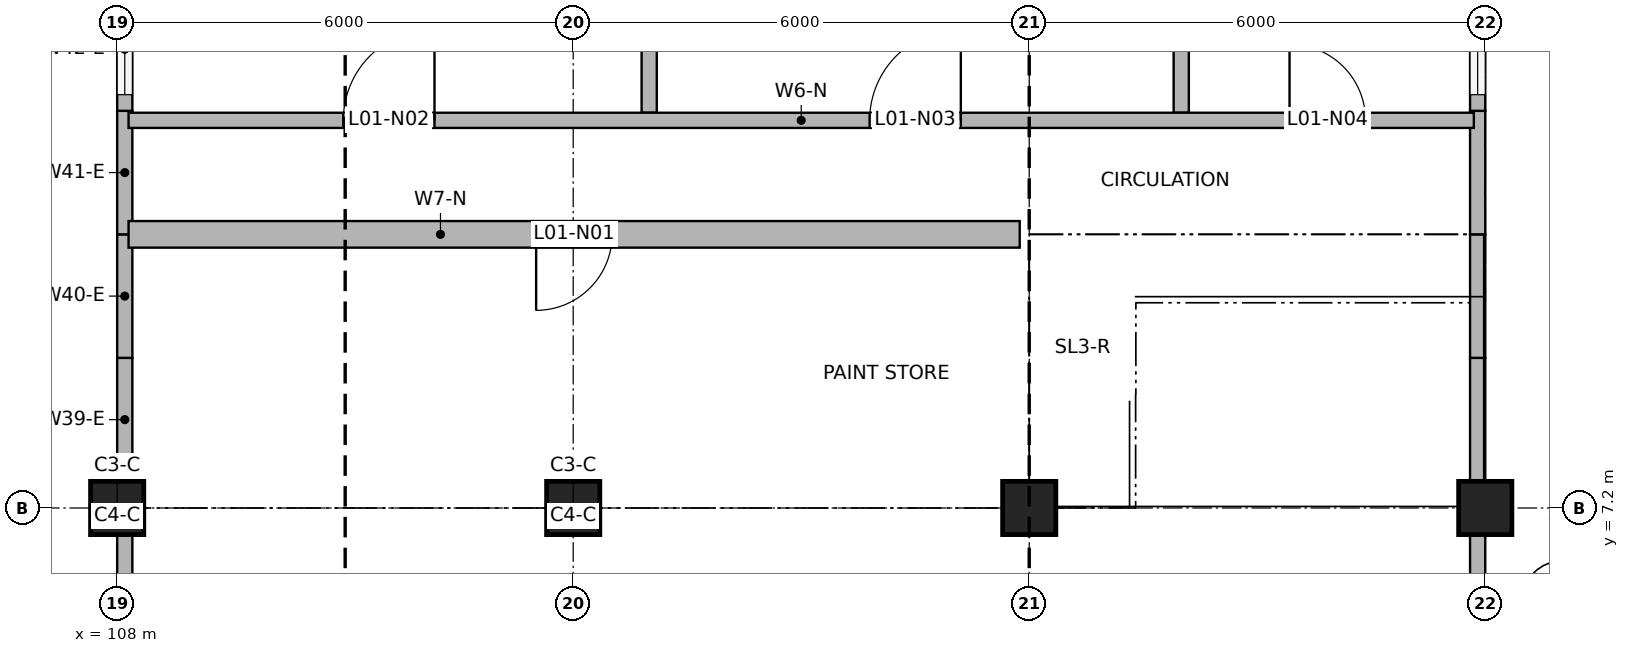
"""IFC4 building model, lengths in metres.
Left out: names, types, materials, properties, quantities, classifications, styles, units other than length and angle.
Written with IfcOpenShell. Run it as: python <this file> out.ifc"""

import sys

from ifc_helpers import new_model, si_unit, direction, frame, frame_2d, origin, origin_2d, place, context, subcontext, project, spatial, rectangle, hollow_rectangle, extrude, element, fill, save


model = new_model("IFC4")
c1 = context("Model", 3, precision=1e-05, world=origin(), true_north=direction((0.0, 1.0)))
c2 = subcontext(c1, "Body", "Model", "MODEL_VIEW")
j1 = project(units=[si_unit("LENGTHUNIT", "METRE"), si_unit("PLANEANGLEUNIT", "RADIAN")], contexts=[c1])
p1 = place(None, origin())
s1 = spatial("IfcSite", under=j1, at=p1, CompositionType="ELEMENT")
p2 = place(p1, origin())
s2 = spatial("IfcBuilding", under=s1, at=p2, CompositionType="ELEMENT")
p3 = place(p2, frame((0.0, 0.0, 4.2)))
s3 = spatial("IfcBuildingStorey", under=s2, at=p3, CompositionType="ELEMENT", Elevation=4.2)
for number, where, z_axis, x_axis in (
    (1, (108.0, 7.2, 0.0), (0.0, 0.0, 1.0), (1.0, 0.0, 0.0)),
    (2, (114.0, 7.2, 0.0), (0.0, 0.0, 1.0), (1.0, 0.0, 0.0)),
    (3, (120.0, 7.2, 0.0), (0.0, 0.0, 1.0), (1.0, 0.0, 0.0)),
    (4, (126.0, 7.2, 0.0), (0.0, 0.0, 1.0), (1.0, 0.0, 0.0)),
):
    element("IfcColumn", number, at=place(p3, frame(where, z_axis=z_axis, x_axis=x_axis)), inside=s3, PredefinedType="COLUMN", context=c2, shape_type="SweptSolid", body=[
        extrude(rectangle(XDim=0.7, YDim=0.7, at=origin_2d()), origin(), (0.0, 0.0, 1.0), 4.004),
    ])
for number, where, z_axis, x_axis in (
    (5, (108.0, 7.1, 4.004), (0.0, 0.0, 1.0), (1.0, 0.0, 0.0)),
    (6, (114.0, 7.1, 4.004), (0.0, 0.0, 1.0), (1.0, 0.0, 0.0)),
    (7, (120.0, 7.1, 4.004), (0.0, 0.0, 1.0), (1.0, 0.0, 0.0)),
    (8, (126.0, 7.1, 4.004), (0.0, 0.0, 1.0), (1.0, 0.0, 0.0)),
):
    element("IfcColumn", number, at=place(p3, frame(where, z_axis=z_axis, x_axis=x_axis)), inside=s3, PredefinedType="COLUMN", context=c2, shape_type="SweptSolid", body=[
        extrude(hollow_rectangle(XDim=0.15, YDim=0.15, WallThickness=0.008, at=origin_2d()), origin(), (0.0, 0.0, 1.0), 1.155),
    ])
p4 = place(p3, frame((125.9, 5.225, 0.0), z_axis=(0.0, 0.0, 1.0), x_axis=(0.0, 1.0, 0.0)))
e9 = element("IfcWall", 9, at=p4, inside=s3, PredefinedType="SOLIDWALL", context=c2, shape_type="SweptSolid", body=[
    extrude(rectangle(XDim=1.625, YDim=0.2, at=frame_2d((0.812, 0.0))), origin(), (0.0, 0.0, 1.0), 5.007),
])
p5 = place(p3, frame((125.9, 7.55, 0.0), z_axis=(0.0, 0.0, 1.0), x_axis=(0.0, 1.0, 0.0)))
e10 = element("IfcWall", 10, at=p5, inside=s3, PredefinedType="SOLIDWALL", context=c2, shape_type="SweptSolid", body=[
    extrude(rectangle(XDim=1.625, YDim=0.2, at=frame_2d((0.812, 0.0))), origin(), (0.0, 0.0, 1.0), 4.059),
])
p6 = place(p3, frame((125.9, 9.175, 0.0), z_axis=(0.0, 0.0, 1.0), x_axis=(0.0, 1.0, 0.0)))
e11 = element("IfcWall", 11, at=p6, inside=s3, PredefinedType="SOLIDWALL", context=c2, shape_type="SweptSolid", body=[
    extrude(rectangle(XDim=1.625, YDim=0.2, at=frame_2d((0.812, 0.0))), origin(), (0.0, 0.0, 1.0), 4.375),
])
p7 = place(p3, frame((125.9, 10.8, 0.0), z_axis=(0.0, 0.0, 1.0), x_axis=(0.0, 1.0, 0.0)))
e12 = element("IfcWall", 12, at=p7, inside=s3, PredefinedType="SOLIDWALL", context=c2, shape_type="SweptSolid", body=[
    extrude(rectangle(XDim=1.625, YDim=0.2, at=frame_2d((0.812, 0.0))), origin(), (0.0, 0.0, 1.0), 4.691),
])
p8 = place(p3, frame((125.9, 12.425, 0.0), z_axis=(0.0, 0.0, 1.0), x_axis=(0.0, 1.0, 0.0)))
e13 = element("IfcWall", 13, at=p8, inside=s3, PredefinedType="SOLIDWALL", context=c2, shape_type="SweptSolid", body=[
    extrude(rectangle(XDim=1.625, YDim=0.2, at=frame_2d((0.812, 0.0))), origin(), (0.0, 0.0, 1.0), 5.007),
])
p9 = place(p8, frame((0.212, 0.0, 1.2)))
e14 = element("IfcOpeningElement", 14, at=p9, cuts=e13, PredefinedType="OPENING", context=c2, shape_type="SweptSolid", body=[
    extrude(rectangle(XDim=1.2, YDim=1.4, at=frame_2d((0.6, 0.7))), frame((0.0, 0.11, 0.0), z_axis=(0.0, -1.0, 0.0), x_axis=(1.0, 0.0, 0.0)), (0.0, 0.0, 1.0), 0.22),
])
p10 = place(p3, frame((108.1, 5.225, 0.0), z_axis=(0.0, 0.0, 1.0), x_axis=(0.0, 1.0, 0.0)))
e15 = element("IfcWall", 15, at=p10, inside=s3, PredefinedType="SOLIDWALL", context=c2, shape_type="SweptSolid", body=[
    extrude(rectangle(XDim=1.625, YDim=0.2, at=frame_2d((0.812, 0.0))), origin(), (0.0, 0.0, 1.0), 5.007),
])
p11 = place(p3, frame((108.1, 7.55, 0.0), z_axis=(0.0, 0.0, 1.0), x_axis=(0.0, 1.0, 0.0)))
e16 = element("IfcWall", 16, at=p11, inside=s3, PredefinedType="SOLIDWALL", context=c2, shape_type="SweptSolid", body=[
    extrude(rectangle(XDim=1.625, YDim=0.2, at=frame_2d((0.812, 0.0))), origin(), (0.0, 0.0, 1.0), 4.059),
])
p12 = place(p3, frame((108.1, 9.175, 0.0), z_axis=(0.0, 0.0, 1.0), x_axis=(0.0, 1.0, 0.0)))
e17 = element("IfcWall", 17, at=p12, inside=s3, PredefinedType="SOLIDWALL", context=c2, shape_type="SweptSolid", body=[
    extrude(rectangle(XDim=1.625, YDim=0.2, at=frame_2d((0.812, 0.0))), origin(), (0.0, 0.0, 1.0), 4.375),
])
p13 = place(p3, frame((108.1, 10.8, 0.0), z_axis=(0.0, 0.0, 1.0), x_axis=(0.0, 1.0, 0.0)))
e18 = element("IfcWall", 18, at=p13, inside=s3, PredefinedType="SOLIDWALL", context=c2, shape_type="SweptSolid", body=[
    extrude(rectangle(XDim=1.625, YDim=0.2, at=frame_2d((0.812, 0.0))), origin(), (0.0, 0.0, 1.0), 4.691),
])
p14 = place(p3, frame((108.1, 12.425, 0.0), z_axis=(0.0, 0.0, 1.0), x_axis=(0.0, 1.0, 0.0)))
e19 = element("IfcWall", 19, at=p14, inside=s3, PredefinedType="SOLIDWALL", context=c2, shape_type="SweptSolid", body=[
    extrude(rectangle(XDim=1.625, YDim=0.2, at=frame_2d((0.812, 0.0))), origin(), (0.0, 0.0, 1.0), 5.007),
])
p15 = place(p14, frame((0.212, 0.0, 1.2)))
e20 = element("IfcOpeningElement", 20, at=p15, cuts=e19, PredefinedType="OPENING", context=c2, shape_type="SweptSolid", body=[
    extrude(rectangle(XDim=1.2, YDim=1.4, at=frame_2d((0.6, 0.7))), frame((0.0, 0.11, 0.0), z_axis=(0.0, -1.0, 0.0), x_axis=(1.0, 0.0, 0.0)), (0.0, 0.0, 1.0), 0.22),
])
for number, where, z_axis, x_axis in (
    (21, (115.0, 12.4, 0.0), (0.0, 0.0, 1.0), (0.0, 1.0, 0.0)),
    (22, (122.0, 12.4, 0.0), (0.0, 0.0, 1.0), (0.0, 1.0, 0.0)),
):
    element("IfcWall", number, at=place(p3, frame(where, z_axis=z_axis, x_axis=x_axis)), inside=s3, PredefinedType="PARTITIONING", context=c2, shape_type="SweptSolid", body=[
        extrude(rectangle(XDim=9.05, YDim=0.2, at=frame_2d((4.525, 0.0))), origin(), (0.0, 0.0, 1.0), 3.204),
    ])
p16 = place(p3, frame((108.15, 10.8, 0.0), z_axis=(0.0, 0.0, 1.0), x_axis=(1.0, 0.0, 0.0)))
e23 = element("IfcWall", 23, at=p16, inside=s3, PredefinedType="PARTITIONING", context=c2, shape_type="SweptSolid", body=[
    extrude(rectangle(XDim=11.725, YDim=0.35, at=frame_2d((5.863, 0.0))), origin(), (0.0, 0.0, 1.0), 3.95),
])
p17 = place(p16, frame((5.363, 0.0, 0.0)))
e24 = element("IfcOpeningElement", 24, at=p17, cuts=e23, PredefinedType="OPENING", context=c2, shape_type="SweptSolid", body=[
    extrude(rectangle(XDim=1.0, YDim=2.1, at=frame_2d((0.5, 1.05))), frame((0.0, 0.185, 0.0), z_axis=(0.0, -1.0, 0.0), x_axis=(1.0, 0.0, 0.0)), (0.0, 0.0, 1.0), 0.37),
])
p18 = place(p3, frame((108.15, 12.3, 0.0), z_axis=(0.0, 0.0, 1.0), x_axis=(1.0, 0.0, 0.0)))
e25 = element("IfcWall", 25, at=p18, inside=s3, PredefinedType="PARTITIONING", context=c2, shape_type="SweptSolid", body=[
    extrude(rectangle(XDim=17.7, YDim=0.2, at=frame_2d((8.85, 0.0))), origin(), (0.0, 0.0, 1.0), 3.95),
])
p19 = place(p18, frame((2.825, 0.0, 0.0)))
e26 = element("IfcOpeningElement", 26, at=p19, cuts=e25, PredefinedType="OPENING", context=c2, shape_type="SweptSolid", body=[
    extrude(rectangle(XDim=1.2, YDim=2.1, at=frame_2d((0.6, 1.05))), frame((0.0, 0.11, 0.0), z_axis=(0.0, -1.0, 0.0), x_axis=(1.0, 0.0, 0.0)), (0.0, 0.0, 1.0), 0.22),
])
p20 = place(p18, frame((9.75, 0.0, 0.0)))
e27 = element("IfcOpeningElement", 27, at=p20, cuts=e25, PredefinedType="OPENING", context=c2, shape_type="SweptSolid", body=[
    extrude(rectangle(XDim=1.2, YDim=2.1, at=frame_2d((0.6, 1.05))), frame((0.0, 0.11, 0.0), z_axis=(0.0, -1.0, 0.0), x_axis=(1.0, 0.0, 0.0)), (0.0, 0.0, 1.0), 0.22),
])
p21 = place(p18, frame((15.275, 0.0, 0.0)))
e28 = element("IfcOpeningElement", 28, at=p21, cuts=e25, PredefinedType="OPENING", context=c2, shape_type="SweptSolid", body=[
    extrude(rectangle(XDim=1.0, YDim=2.1, at=frame_2d((0.5, 1.05))), frame((0.0, 0.11, 0.0), z_axis=(0.0, -1.0, 0.0), x_axis=(1.0, 0.0, 0.0)), (0.0, 0.0, 1.0), 0.22),
])
p22 = place(p9, origin())
e29 = element("IfcWindow", 29, at=p22, inside=s3, PartitioningType="SINGLE_PANEL", PredefinedType="WINDOW", context=c2, shape_type="SweptSolid", body=[
    extrude(rectangle(XDim=1.2, YDim=1.4, at=frame_2d((0.6, 0.7))), frame((0.0, 0.03, 0.0), z_axis=(0.0, -1.0, 0.0), x_axis=(1.0, 0.0, 0.0)), (0.0, 0.0, 1.0), 0.06),
])
fill(e14, e29)
p23 = place(p15, origin())
e30 = element("IfcWindow", 30, at=p23, inside=s3, PartitioningType="SINGLE_PANEL", PredefinedType="WINDOW", context=c2, shape_type="SweptSolid", body=[
    extrude(rectangle(XDim=1.2, YDim=1.4, at=frame_2d((0.6, 0.7))), frame((0.0, 0.03, 0.0), z_axis=(0.0, -1.0, 0.0), x_axis=(1.0, 0.0, 0.0)), (0.0, 0.0, 1.0), 0.06),
])
fill(e20, e30)
p24 = place(p17, frame((1.0, 0.0, 0.0), z_axis=(0.0, 0.0, 1.0), x_axis=(-1.0, 0.0, 0.0)))
e31 = element("IfcDoor", 31, at=p24, inside=s3, OperationType="SINGLE_SWING_RIGHT", PredefinedType="DOOR", context=c2, shape_type="SweptSolid", body=[
    extrude(rectangle(XDim=1.0, YDim=2.1, at=frame_2d((0.5, 1.05))), frame((0.0, 0.025, 0.0), z_axis=(0.0, -1.0, 0.0), x_axis=(1.0, 0.0, 0.0)), (0.0, 0.0, 1.0), 0.05),
])
fill(e24, e31)
p25 = place(p19, origin())
e32 = element("IfcDoor", 32, at=p25, inside=s3, OperationType="SINGLE_SWING_RIGHT", PredefinedType="DOOR", context=c2, shape_type="SweptSolid", body=[
    extrude(rectangle(XDim=1.2, YDim=2.1, at=frame_2d((0.6, 1.05))), frame((0.0, 0.025, 0.0), z_axis=(0.0, -1.0, 0.0), x_axis=(1.0, 0.0, 0.0)), (0.0, 0.0, 1.0), 0.05),
])
fill(e26, e32)
p26 = place(p20, origin())
e33 = element("IfcDoor", 33, at=p26, inside=s3, OperationType="SINGLE_SWING_RIGHT", PredefinedType="DOOR", context=c2, shape_type="SweptSolid", body=[
    extrude(rectangle(XDim=1.2, YDim=2.1, at=frame_2d((0.6, 1.05))), frame((0.0, 0.025, 0.0), z_axis=(0.0, -1.0, 0.0), x_axis=(1.0, 0.0, 0.0)), (0.0, 0.0, 1.0), 0.05),
])
fill(e27, e33)
p27 = place(p21, origin())
e34 = element("IfcDoor", 34, at=p27, inside=s3, OperationType="SINGLE_SWING_LEFT", PredefinedType="DOOR", context=c2, shape_type="SweptSolid", body=[
    extrude(rectangle(XDim=1.0, YDim=2.1, at=frame_2d((0.5, 1.05))), frame((0.0, 0.025, 0.0), z_axis=(0.0, -1.0, 0.0), x_axis=(1.0, 0.0, 0.0)), (0.0, 0.0, 1.0), 0.05),
])
fill(e28, e34)
save(model, sys.argv[1])
